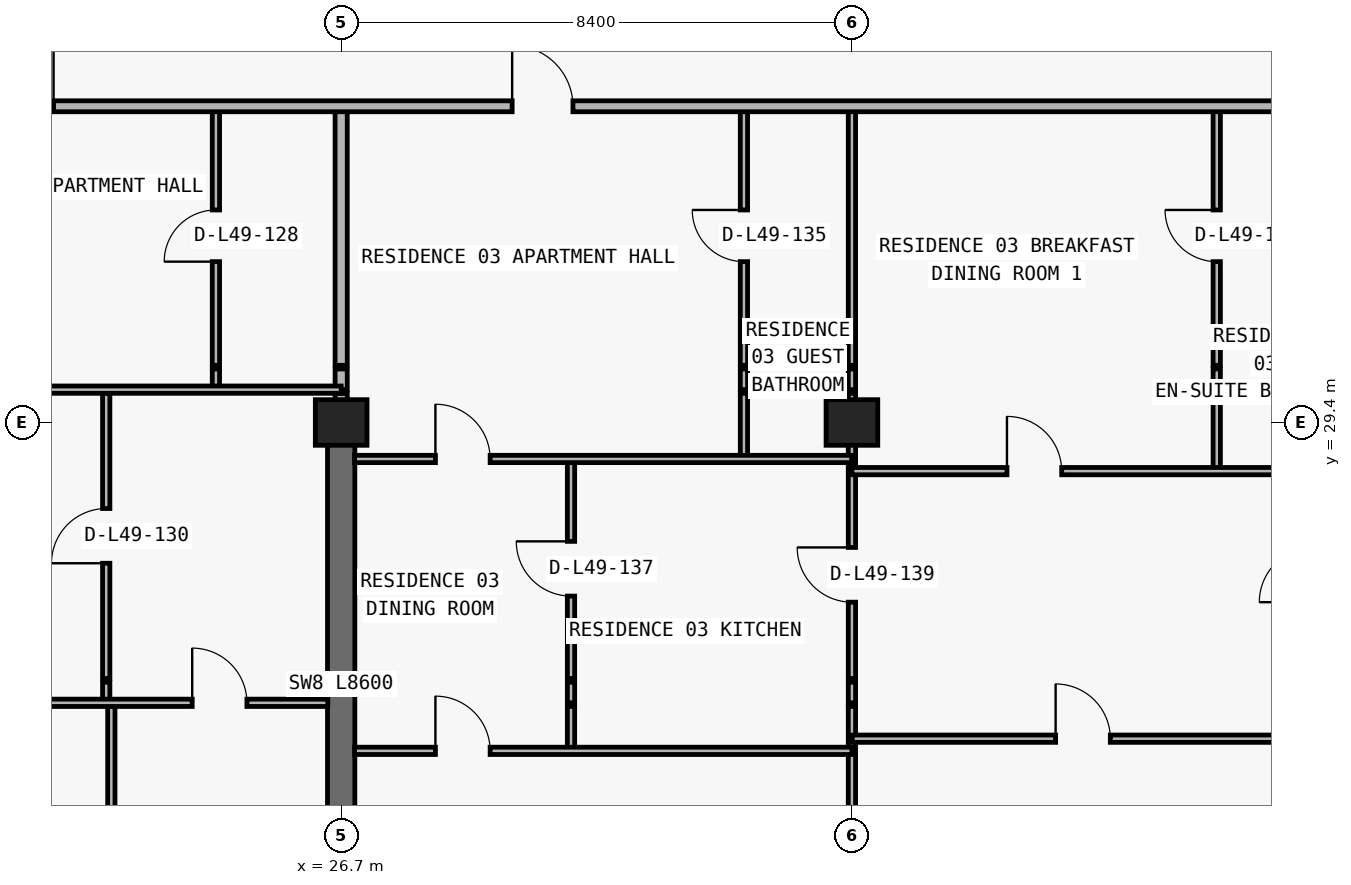
"""IFC4 building model, lengths in metres.
Left out: names, types, materials, properties, quantities, classifications, styles, units other than length and angle.
Written with IfcOpenShell. Run it as: python <this file> out.ifc"""

import sys

from ifc_helpers import new_model, si_unit, direction, frame, frame_2d, origin, origin_2d, place, context, subcontext, project, spatial, rectangle, extrude, element, fill, save


model = new_model("IFC4")
c1 = context("Model", 3, precision=1e-05, world=origin(), true_north=direction((0.0, 1.0)))
c2 = subcontext(c1, "Body", "Model", "MODEL_VIEW")
j1 = project(units=[si_unit("LENGTHUNIT", "METRE"), si_unit("PLANEANGLEUNIT", "RADIAN")], contexts=[c1])
p1 = place(None, origin())
s1 = spatial("IfcSite", under=j1, at=p1, CompositionType="ELEMENT")
p2 = place(p1, origin())
s2 = spatial("IfcBuilding", under=s1, at=p2, CompositionType="ELEMENT")
p3 = place(p2, frame((0.0, 0.0, 177.0)))
s3 = spatial("IfcBuildingStorey", under=s2, at=p3, CompositionType="ELEMENT", Elevation=177.0)
for number, where, z_axis, x_axis in (
    (1, (26.7, 29.4, 0.0), (0.0, 0.0, 1.0), (1.0, 0.0, 0.0)),
    (2, (35.1, 29.4, 0.0), (0.0, 0.0, 1.0), (1.0, 0.0, 0.0)),
):
    element("IfcColumn", number, at=place(p3, frame(where, z_axis=z_axis, x_axis=x_axis)), inside=s3, PredefinedType="COLUMN", context=c2, shape_type="SweptSolid", body=[
        extrude(rectangle(XDim=0.85, YDim=0.75, at=origin_2d()), origin(), (0.0, 0.0, 1.0), 3.05),
    ])
p4 = place(p3, frame((26.7, 20.8, 0.0), z_axis=(0.0, 0.0, 1.0), x_axis=(0.0, 1.0, 0.0)))
e3 = element("IfcWall", 3, at=p4, inside=s3, PredefinedType="SHEAR", context=c2, shape_type="SweptSolid", body=[
    extrude(rectangle(XDim=8.6, YDim=0.45, at=frame_2d((4.3, 0.0))), origin(), (0.0, 0.0, 1.0), 3.05),
])
p5 = place(p3, frame((22.836, 24.79, 0.0), z_axis=(0.0, 0.0, 1.0), x_axis=(0.0, 1.0, 0.0)))
e4 = element("IfcWall", 4, at=p5, inside=s3, PredefinedType="PARTITIONING", context=c2, shape_type="SweptSolid", body=[
    extrude(rectangle(XDim=0.34, YDim=0.12, at=frame_2d((0.17, 0.0))), origin(), (0.0, 0.0, 1.0), 3.05),
])
p6 = place(p3, frame((22.836, 25.19, 0.0), z_axis=(0.0, 0.0, 1.0), x_axis=(0.0, 1.0, 0.0)))
e5 = element("IfcWall", 5, at=p6, inside=s3, PredefinedType="PARTITIONING", context=c2, shape_type="SweptSolid", body=[
    extrude(rectangle(XDim=4.69, YDim=0.12, at=frame_2d((2.345, 0.0))), origin(), (0.0, 0.0, 1.0), 3.05),
])
p7 = place(p6, frame((1.895, 0.0, 0.0)))
e6 = element("IfcOpeningElement", 6, at=p7, cuts=e5, PredefinedType="OPENING", context=c2, shape_type="SweptSolid", body=[
    extrude(rectangle(XDim=0.9, YDim=2.15, at=frame_2d((0.45, 1.075))), frame((0.0, 0.07, 0.0), z_axis=(0.0, -1.0, 0.0), x_axis=(1.0, 0.0, 0.0)), (0.0, 0.0, 1.0), 0.14),
])
p8 = place(p3, frame((22.92, 11.24, 0.0), z_axis=(0.0, 0.0, 1.0), x_axis=(0.0, 1.0, 0.0)))
e7 = element("IfcWall", 7, at=p8, inside=s3, PredefinedType="PARTITIONING", context=c2, shape_type="SweptSolid", body=[
    extrude(rectangle(XDim=13.49, YDim=0.12, at=frame_2d((6.745, 0.0))), origin(), (0.0, 0.0, 1.0), 3.05),
])
p9 = place(p3, frame((24.64, 29.94, 0.0), z_axis=(0.0, 0.0, 1.0), x_axis=(0.0, 1.0, 0.0)))
e8 = element("IfcWall", 8, at=p9, inside=s3, PredefinedType="PARTITIONING", context=c2, shape_type="SweptSolid", body=[
    extrude(rectangle(XDim=0.34, YDim=0.12, at=frame_2d((0.17, 0.0))), origin(), (0.0, 0.0, 1.0), 3.05),
])
p10 = place(p3, frame((24.64, 30.34, 0.0), z_axis=(0.0, 0.0, 1.0), x_axis=(0.0, 1.0, 0.0)))
e9 = element("IfcWall", 9, at=p10, inside=s3, PredefinedType="PARTITIONING", context=c2, shape_type="SweptSolid", body=[
    extrude(rectangle(XDim=4.26, YDim=0.12, at=frame_2d((2.13, 0.0))), origin(), (0.0, 0.0, 1.0), 3.05),
])
p11 = place(p10, frame((1.705, 0.0, 0.0)))
e10 = element("IfcOpeningElement", 10, at=p11, cuts=e9, PredefinedType="OPENING", context=c2, shape_type="SweptSolid", body=[
    extrude(rectangle(XDim=0.85, YDim=2.1, at=frame_2d((0.425, 1.05))), frame((0.0, 0.07, 0.0), z_axis=(0.0, -1.0, 0.0), x_axis=(1.0, 0.0, 0.0)), (0.0, 0.0, 1.0), 0.14),
])
p12 = place(p3, frame((26.7, 29.405, 0.0), z_axis=(0.0, 0.0, 1.0), x_axis=(0.0, 1.0, 0.0)))
e11 = element("IfcWall", 11, at=p12, inside=s3, PredefinedType="PARTITIONING", context=c2, shape_type="SweptSolid", body=[
    extrude(rectangle(XDim=0.475, YDim=0.2, at=frame_2d((0.237, 0.0))), origin(), (0.0, 0.0, 1.0), 2.335),
])
p13 = place(p3, frame((26.7, 29.94, 0.0), z_axis=(0.0, 0.0, 1.0), x_axis=(0.0, 1.0, 0.0)))
e12 = element("IfcWall", 12, at=p13, inside=s3, PredefinedType="PARTITIONING", context=c2, shape_type="SweptSolid", body=[
    extrude(rectangle(XDim=0.34, YDim=0.2, at=frame_2d((0.17, 0.0))), origin(), (0.0, 0.0, 1.0), 2.335),
])
p14 = place(p3, frame((26.7, 30.34, 0.0), z_axis=(0.0, 0.0, 1.0), x_axis=(0.0, 1.0, 0.0)))
e13 = element("IfcWall", 13, at=p14, inside=s3, PredefinedType="PARTITIONING", context=c2, shape_type="SweptSolid", body=[
    extrude(rectangle(XDim=4.26, YDim=0.2, at=frame_2d((2.13, 0.0))), origin(), (0.0, 0.0, 1.0), 2.335),
])
p15 = place(p3, frame((30.48, 24.0, 0.0), z_axis=(0.0, 0.0, 1.0), x_axis=(0.0, 1.0, 0.0)))
e14 = element("IfcWall", 14, at=p15, inside=s3, PredefinedType="PARTITIONING", context=c2, shape_type="SweptSolid", body=[
    extrude(rectangle(XDim=0.73, YDim=0.12, at=frame_2d((0.365, 0.0))), origin(), (0.0, 0.0, 1.0), 3.05),
])
p16 = place(p3, frame((30.48, 24.79, 0.0), z_axis=(0.0, 0.0, 1.0), x_axis=(0.0, 1.0, 0.0)))
e15 = element("IfcWall", 15, at=p16, inside=s3, PredefinedType="PARTITIONING", context=c2, shape_type="SweptSolid", body=[
    extrude(rectangle(XDim=0.34, YDim=0.12, at=frame_2d((0.17, 0.0))), origin(), (0.0, 0.0, 1.0), 3.05),
])
p17 = place(p3, frame((30.48, 25.19, 0.0), z_axis=(0.0, 0.0, 1.0), x_axis=(0.0, 1.0, 0.0)))
e16 = element("IfcWall", 16, at=p17, inside=s3, PredefinedType="PARTITIONING", context=c2, shape_type="SweptSolid", body=[
    extrude(rectangle(XDim=3.61, YDim=0.12, at=frame_2d((1.805, 0.0))), origin(), (0.0, 0.0, 1.0), 3.05),
])
p18 = place(p17, frame((1.355, 0.0, 0.0)))
e17 = element("IfcOpeningElement", 17, at=p18, cuts=e16, PredefinedType="OPENING", context=c2, shape_type="SweptSolid", body=[
    extrude(rectangle(XDim=0.9, YDim=2.15, at=frame_2d((0.45, 1.075))), frame((0.0, 0.07, 0.0), z_axis=(0.0, -1.0, 0.0), x_axis=(1.0, 0.0, 0.0)), (0.0, 0.0, 1.0), 0.14),
])
p19 = place(p3, frame((33.324, 28.8, 0.0), z_axis=(0.0, 0.0, 1.0), x_axis=(0.0, 1.0, 0.0)))
e18 = element("IfcWall", 18, at=p19, inside=s3, PredefinedType="PARTITIONING", context=c2, shape_type="SweptSolid", body=[
    extrude(rectangle(XDim=1.08, YDim=0.12, at=frame_2d((0.54, 0.0))), origin(), (0.0, 0.0, 1.0), 3.05),
])
p20 = place(p3, frame((33.324, 29.94, 0.0), z_axis=(0.0, 0.0, 1.0), x_axis=(0.0, 1.0, 0.0)))
e19 = element("IfcWall", 19, at=p20, inside=s3, PredefinedType="PARTITIONING", context=c2, shape_type="SweptSolid", body=[
    extrude(rectangle(XDim=0.34, YDim=0.12, at=frame_2d((0.17, 0.0))), origin(), (0.0, 0.0, 1.0), 3.05),
])
p21 = place(p3, frame((33.324, 30.34, 0.0), z_axis=(0.0, 0.0, 1.0), x_axis=(0.0, 1.0, 0.0)))
e20 = element("IfcWall", 20, at=p21, inside=s3, PredefinedType="PARTITIONING", context=c2, shape_type="SweptSolid", body=[
    extrude(rectangle(XDim=4.26, YDim=0.12, at=frame_2d((2.13, 0.0))), origin(), (0.0, 0.0, 1.0), 3.05),
])
p22 = place(p21, frame((1.705, 0.0, 0.0)))
e21 = element("IfcOpeningElement", 21, at=p22, cuts=e20, PredefinedType="OPENING", context=c2, shape_type="SweptSolid", body=[
    extrude(rectangle(XDim=0.85, YDim=2.1, at=frame_2d((0.425, 1.05))), frame((0.0, 0.07, 0.0), z_axis=(0.0, -1.0, 0.0), x_axis=(1.0, 0.0, 0.0)), (0.0, 0.0, 1.0), 0.14),
])
p23 = place(p3, frame((35.1, 11.24, 0.0), z_axis=(0.0, 0.0, 1.0), x_axis=(0.0, 1.0, 0.0)))
e22 = element("IfcWall", 22, at=p23, inside=s3, PredefinedType="PARTITIONING", context=c2, shape_type="SweptSolid", body=[
    extrude(rectangle(XDim=13.49, YDim=0.12, at=frame_2d((6.745, 0.0))), origin(), (0.0, 0.0, 1.0), 2.263),
])
p24 = place(p3, frame((35.1, 24.79, 0.0), z_axis=(0.0, 0.0, 1.0), x_axis=(0.0, 1.0, 0.0)))
e23 = element("IfcWall", 23, at=p24, inside=s3, PredefinedType="PARTITIONING", context=c2, shape_type="SweptSolid", body=[
    extrude(rectangle(XDim=0.34, YDim=0.12, at=frame_2d((0.17, 0.0))), origin(), (0.0, 0.0, 1.0), 2.263),
])
p25 = place(p3, frame((35.1, 25.19, 0.0), z_axis=(0.0, 0.0, 1.0), x_axis=(0.0, 1.0, 0.0)))
e24 = element("IfcWall", 24, at=p25, inside=s3, PredefinedType="PARTITIONING", context=c2, shape_type="SweptSolid", body=[
    extrude(rectangle(XDim=4.69, YDim=0.12, at=frame_2d((2.345, 0.0))), origin(), (0.0, 0.0, 1.0), 2.263),
])
p26 = place(p25, frame((1.255, 0.0, 0.0)))
e25 = element("IfcOpeningElement", 25, at=p26, cuts=e24, PredefinedType="OPENING", context=c2, shape_type="SweptSolid", body=[
    extrude(rectangle(XDim=0.9, YDim=2.15, at=frame_2d((0.45, 1.075))), frame((0.0, 0.07, 0.0), z_axis=(0.0, -1.0, 0.0), x_axis=(1.0, 0.0, 0.0)), (0.0, 0.0, 1.0), 0.14),
])
p27 = place(p3, frame((35.1, 29.94, 0.0), z_axis=(0.0, 0.0, 1.0), x_axis=(0.0, 1.0, 0.0)))
e26 = element("IfcWall", 26, at=p27, inside=s3, PredefinedType="PARTITIONING", context=c2, shape_type="SweptSolid", body=[
    extrude(rectangle(XDim=0.34, YDim=0.12, at=frame_2d((0.17, 0.0))), origin(), (0.0, 0.0, 1.0), 2.263),
])
p28 = place(p3, frame((35.1, 30.34, 0.0), z_axis=(0.0, 0.0, 1.0), x_axis=(0.0, 1.0, 0.0)))
e27 = element("IfcWall", 27, at=p28, inside=s3, PredefinedType="PARTITIONING", context=c2, shape_type="SweptSolid", body=[
    extrude(rectangle(XDim=4.26, YDim=0.12, at=frame_2d((2.13, 0.0))), origin(), (0.0, 0.0, 1.0), 2.263),
])
p29 = place(p3, frame((41.1, 28.6, 0.0), z_axis=(0.0, 0.0, 1.0), x_axis=(0.0, 1.0, 0.0)))
e28 = element("IfcWall", 28, at=p29, inside=s3, PredefinedType="PARTITIONING", context=c2, shape_type="SweptSolid", body=[
    extrude(rectangle(XDim=1.28, YDim=0.12, at=frame_2d((0.64, 0.0))), origin(), (0.0, 0.0, 1.0), 3.05),
])
p30 = place(p3, frame((41.1, 29.94, 0.0), z_axis=(0.0, 0.0, 1.0), x_axis=(0.0, 1.0, 0.0)))
e29 = element("IfcWall", 29, at=p30, inside=s3, PredefinedType="PARTITIONING", context=c2, shape_type="SweptSolid", body=[
    extrude(rectangle(XDim=0.34, YDim=0.12, at=frame_2d((0.17, 0.0))), origin(), (0.0, 0.0, 1.0), 3.05),
])
p31 = place(p3, frame((41.1, 30.34, 0.0), z_axis=(0.0, 0.0, 1.0), x_axis=(0.0, 1.0, 0.0)))
e30 = element("IfcWall", 30, at=p31, inside=s3, PredefinedType="PARTITIONING", context=c2, shape_type="SweptSolid", body=[
    extrude(rectangle(XDim=4.26, YDim=0.12, at=frame_2d((2.13, 0.0))), origin(), (0.0, 0.0, 1.0), 3.05),
])
p32 = place(p31, frame((1.705, 0.0, 0.0)))
e31 = element("IfcOpeningElement", 31, at=p32, cuts=e30, PredefinedType="OPENING", context=c2, shape_type="SweptSolid", body=[
    extrude(rectangle(XDim=0.85, YDim=2.1, at=frame_2d((0.425, 1.05))), frame((0.0, 0.07, 0.0), z_axis=(0.0, -1.0, 0.0), x_axis=(1.0, 0.0, 0.0)), (0.0, 0.0, 1.0), 0.14),
])
p33 = place(p3, frame((26.92, 24.0, 0.0), z_axis=(0.0, 0.0, 1.0), x_axis=(1.0, 0.0, 0.0)))
e32 = element("IfcWall", 32, at=p33, inside=s3, PredefinedType="PARTITIONING", context=c2, shape_type="SweptSolid", body=[
    extrude(rectangle(XDim=8.18, YDim=0.12, at=frame_2d((4.09, 0.0))), origin(), (0.0, 0.0, 1.0), 3.05),
])
p34 = place(p33, frame((1.33, 0.0, 0.0)))
e33 = element("IfcOpeningElement", 33, at=p34, cuts=e32, PredefinedType="OPENING", context=c2, shape_type="SweptSolid", body=[
    extrude(rectangle(XDim=0.9, YDim=2.15, at=frame_2d((0.45, 1.075))), frame((0.0, 0.07, 0.0), z_axis=(0.0, -1.0, 0.0), x_axis=(1.0, 0.0, 0.0)), (0.0, 0.0, 1.0), 0.14),
])
p35 = place(p3, frame((35.105, 24.2, 0.0), z_axis=(0.0, 0.0, 1.0), x_axis=(1.0, 0.0, 0.0)))
e34 = element("IfcWall", 34, at=p35, inside=s3, PredefinedType="PARTITIONING", context=c2, shape_type="SweptSolid", body=[
    extrude(rectangle(XDim=7.59, YDim=0.12, at=frame_2d((3.795, 0.0))), origin(), (0.0, 0.0, 1.0), 3.05),
])
p36 = place(p35, frame((3.345, 0.0, 0.0)))
e35 = element("IfcOpeningElement", 35, at=p36, cuts=e34, PredefinedType="OPENING", context=c2, shape_type="SweptSolid", body=[
    extrude(rectangle(XDim=0.9, YDim=2.15, at=frame_2d((0.45, 1.075))), frame((0.0, 0.07, 0.0), z_axis=(0.0, -1.0, 0.0), x_axis=(1.0, 0.0, 0.0)), (0.0, 0.0, 1.0), 0.14),
])
p37 = place(p3, frame((18.3, 24.79, 0.0), z_axis=(0.0, 0.0, 1.0), x_axis=(1.0, 0.0, 0.0)))
e36 = element("IfcWall", 36, at=p37, inside=s3, PredefinedType="PARTITIONING", context=c2, shape_type="SweptSolid", body=[
    extrude(rectangle(XDim=8.18, YDim=0.12, at=frame_2d((4.09, 0.0))), origin(), (0.0, 0.0, 1.0), 3.05),
])
p38 = place(p37, frame((1.818, 0.0, 0.0)))
e37 = element("IfcOpeningElement", 37, at=p38, cuts=e36, PredefinedType="OPENING", context=c2, shape_type="SweptSolid", body=[
    extrude(rectangle(XDim=0.9, YDim=2.15, at=frame_2d((0.45, 1.075))), frame((0.0, 0.07, 0.0), z_axis=(0.0, -1.0, 0.0), x_axis=(1.0, 0.0, 0.0)), (0.0, 0.0, 1.0), 0.14),
])
p39 = place(p37, frame((5.95, 0.0, 0.0)))
e38 = element("IfcOpeningElement", 38, at=p39, cuts=e36, PredefinedType="OPENING", context=c2, shape_type="SweptSolid", body=[
    extrude(rectangle(XDim=0.9, YDim=2.15, at=frame_2d((0.45, 1.075))), frame((0.0, 0.07, 0.0), z_axis=(0.0, -1.0, 0.0), x_axis=(1.0, 0.0, 0.0)), (0.0, 0.0, 1.0), 0.14),
])
p40 = place(p3, frame((35.1, 28.6, 0.0), z_axis=(0.0, 0.0, 1.0), x_axis=(1.0, 0.0, 0.0)))
e39 = element("IfcWall", 39, at=p40, inside=s3, PredefinedType="PARTITIONING", context=c2, shape_type="SweptSolid", body=[
    extrude(rectangle(XDim=7.6, YDim=0.12, at=frame_2d((3.8, 0.0))), origin(), (0.0, 0.0, 1.0), 3.05),
])
p41 = place(p40, frame((2.55, 0.0, 0.0)))
e40 = element("IfcOpeningElement", 40, at=p41, cuts=e39, PredefinedType="OPENING", context=c2, shape_type="SweptSolid", body=[
    extrude(rectangle(XDim=0.9, YDim=2.15, at=frame_2d((0.45, 1.075))), frame((0.0, 0.07, 0.0), z_axis=(0.0, -1.0, 0.0), x_axis=(1.0, 0.0, 0.0)), (0.0, 0.0, 1.0), 0.14),
])
p42 = place(p3, frame((26.92, 28.8, 0.0), z_axis=(0.0, 0.0, 1.0), x_axis=(1.0, 0.0, 0.0)))
e41 = element("IfcWall", 41, at=p42, inside=s3, PredefinedType="PARTITIONING", context=c2, shape_type="SweptSolid", body=[
    extrude(rectangle(XDim=8.175, YDim=0.12, at=frame_2d((4.087, 0.0))), origin(), (0.0, 0.0, 1.0), 3.05),
])
p43 = place(p42, frame((1.33, 0.0, 0.0)))
e42 = element("IfcOpeningElement", 42, at=p43, cuts=e41, PredefinedType="OPENING", context=c2, shape_type="SweptSolid", body=[
    extrude(rectangle(XDim=0.9, YDim=2.15, at=frame_2d((0.45, 1.075))), frame((0.0, 0.07, 0.0), z_axis=(0.0, -1.0, 0.0), x_axis=(1.0, 0.0, 0.0)), (0.0, 0.0, 1.0), 0.14),
])
p44 = place(p3, frame((18.3, 29.94, 0.0), z_axis=(0.0, 0.0, 1.0), x_axis=(1.0, 0.0, 0.0)))
e43 = element("IfcWall", 43, at=p44, inside=s3, PredefinedType="PARTITIONING", context=c2, shape_type="SweptSolid", body=[
    extrude(rectangle(XDim=8.4, YDim=0.12, at=frame_2d((4.2, 0.0))), origin(), (0.0, 0.0, 1.0), 3.05),
])
p45 = place(p44, frame((1.818, 0.0, 0.0)))
e44 = element("IfcOpeningElement", 44, at=p45, cuts=e43, PredefinedType="OPENING", context=c2, shape_type="SweptSolid", body=[
    extrude(rectangle(XDim=0.9, YDim=2.15, at=frame_2d((0.45, 1.075))), frame((0.0, 0.07, 0.0), z_axis=(0.0, -1.0, 0.0), x_axis=(1.0, 0.0, 0.0)), (0.0, 0.0, 1.0), 0.14),
])
p46 = place(p3, frame((18.3, 34.6, 0.0), z_axis=(0.0, 0.0, 1.0), x_axis=(1.0, 0.0, 0.0)))
e45 = element("IfcWall", 45, at=p46, inside=s3, PredefinedType="PARTITIONING", context=c2, shape_type="SweptSolid", body=[
    extrude(rectangle(XDim=41.2, YDim=0.18, at=frame_2d((20.6, 0.0))), origin(), (0.0, 0.0, 1.0), 3.05),
])
p47 = place(p46, frame((2.67, 0.0, 0.0)))
e46 = element("IfcOpeningElement", 46, at=p47, cuts=e45, PredefinedType="OPENING", context=c2, shape_type="SweptSolid", body=[
    extrude(rectangle(XDim=1.0, YDim=2.2, at=frame_2d((0.5, 1.1))), frame((0.0, 0.1, 0.0), z_axis=(0.0, -1.0, 0.0), x_axis=(1.0, 0.0, 0.0)), (0.0, 0.0, 1.0), 0.2),
])
p48 = place(p46, frame((11.212, 0.0, 0.0)))
e47 = element("IfcOpeningElement", 47, at=p48, cuts=e45, PredefinedType="OPENING", context=c2, shape_type="SweptSolid", body=[
    extrude(rectangle(XDim=1.0, YDim=2.2, at=frame_2d((0.5, 1.1))), frame((0.0, 0.1, 0.0), z_axis=(0.0, -1.0, 0.0), x_axis=(1.0, 0.0, 0.0)), (0.0, 0.0, 1.0), 0.2),
])
p49 = place(p46, frame((35.483, 0.0, 0.0)))
e48 = element("IfcOpeningElement", 48, at=p49, cuts=e45, PredefinedType="OPENING", context=c2, shape_type="SweptSolid", body=[
    extrude(rectangle(XDim=1.0, YDim=2.2, at=frame_2d((0.5, 1.1))), frame((0.0, 0.1, 0.0), z_axis=(0.0, -1.0, 0.0), x_axis=(1.0, 0.0, 0.0)), (0.0, 0.0, 1.0), 0.2),
])
p50 = place(p47, origin())
e49 = element("IfcDoor", 49, at=p50, inside=s3, OperationType="SINGLE_SWING_RIGHT", PredefinedType="DOOR", context=c2, shape_type="SweptSolid", body=[
    extrude(rectangle(XDim=1.0, YDim=2.2, at=frame_2d((0.5, 1.1))), frame((0.0, 0.025, 0.0), z_axis=(0.0, -1.0, 0.0), x_axis=(1.0, 0.0, 0.0)), (0.0, 0.0, 1.0), 0.05),
])
fill(e46, e49)
p51 = place(p11, origin())
e50 = element("IfcDoor", 50, at=p51, inside=s3, OperationType="SINGLE_SWING_LEFT", PredefinedType="DOOR", context=c2, shape_type="SweptSolid", body=[
    extrude(rectangle(XDim=0.85, YDim=2.1, at=frame_2d((0.425, 1.05))), frame((0.0, 0.025, 0.0), z_axis=(0.0, -1.0, 0.0), x_axis=(1.0, 0.0, 0.0)), (0.0, 0.0, 1.0), 0.05),
])
fill(e10, e50)
p52 = place(p7, origin())
e51 = element("IfcDoor", 51, at=p52, inside=s3, OperationType="SINGLE_SWING_LEFT", PredefinedType="DOOR", context=c2, shape_type="SweptSolid", body=[
    extrude(rectangle(XDim=0.9, YDim=2.15, at=frame_2d((0.45, 1.075))), frame((0.0, 0.025, 0.0), z_axis=(0.0, -1.0, 0.0), x_axis=(1.0, 0.0, 0.0)), (0.0, 0.0, 1.0), 0.05),
])
fill(e6, e51)
p53 = place(p39, origin())
e52 = element("IfcDoor", 52, at=p53, inside=s3, OperationType="SINGLE_SWING_LEFT", PredefinedType="DOOR", context=c2, shape_type="SweptSolid", body=[
    extrude(rectangle(XDim=0.9, YDim=2.15, at=frame_2d((0.45, 1.075))), frame((0.0, 0.025, 0.0), z_axis=(0.0, -1.0, 0.0), x_axis=(1.0, 0.0, 0.0)), (0.0, 0.0, 1.0), 0.05),
])
fill(e38, e52)
p54 = place(p48, origin())
e53 = element("IfcDoor", 53, at=p54, inside=s3, OperationType="SINGLE_SWING_LEFT", PredefinedType="DOOR", context=c2, shape_type="SweptSolid", body=[
    extrude(rectangle(XDim=1.0, YDim=2.2, at=frame_2d((0.5, 1.1))), frame((0.0, 0.025, 0.0), z_axis=(0.0, -1.0, 0.0), x_axis=(1.0, 0.0, 0.0)), (0.0, 0.0, 1.0), 0.05),
])
fill(e47, e53)
p55 = place(p22, origin())
e54 = element("IfcDoor", 54, at=p55, inside=s3, OperationType="SINGLE_SWING_RIGHT", PredefinedType="DOOR", context=c2, shape_type="SweptSolid", body=[
    extrude(rectangle(XDim=0.85, YDim=2.1, at=frame_2d((0.425, 1.05))), frame((0.0, 0.025, 0.0), z_axis=(0.0, -1.0, 0.0), x_axis=(1.0, 0.0, 0.0)), (0.0, 0.0, 1.0), 0.05),
])
fill(e21, e54)
p56 = place(p43, origin())
e55 = element("IfcDoor", 55, at=p56, inside=s3, OperationType="SINGLE_SWING_LEFT", PredefinedType="DOOR", context=c2, shape_type="SweptSolid", body=[
    extrude(rectangle(XDim=0.9, YDim=2.15, at=frame_2d((0.45, 1.075))), frame((0.0, 0.025, 0.0), z_axis=(0.0, -1.0, 0.0), x_axis=(1.0, 0.0, 0.0)), (0.0, 0.0, 1.0), 0.05),
])
fill(e42, e55)
p57 = place(p18, origin())
e56 = element("IfcDoor", 56, at=p57, inside=s3, OperationType="SINGLE_SWING_RIGHT", PredefinedType="DOOR", context=c2, shape_type="SweptSolid", body=[
    extrude(rectangle(XDim=0.9, YDim=2.15, at=frame_2d((0.45, 1.075))), frame((0.0, 0.025, 0.0), z_axis=(0.0, -1.0, 0.0), x_axis=(1.0, 0.0, 0.0)), (0.0, 0.0, 1.0), 0.05),
])
fill(e17, e56)
p58 = place(p34, origin())
e57 = element("IfcDoor", 57, at=p58, inside=s3, OperationType="SINGLE_SWING_LEFT", PredefinedType="DOOR", context=c2, shape_type="SweptSolid", body=[
    extrude(rectangle(XDim=0.9, YDim=2.15, at=frame_2d((0.45, 1.075))), frame((0.0, 0.025, 0.0), z_axis=(0.0, -1.0, 0.0), x_axis=(1.0, 0.0, 0.0)), (0.0, 0.0, 1.0), 0.05),
])
fill(e33, e57)
p59 = place(p26, origin())
e58 = element("IfcDoor", 58, at=p59, inside=s3, OperationType="SINGLE_SWING_RIGHT", PredefinedType="DOOR", context=c2, shape_type="SweptSolid", body=[
    extrude(rectangle(XDim=0.9, YDim=2.15, at=frame_2d((0.45, 1.075))), frame((0.0, 0.025, 0.0), z_axis=(0.0, -1.0, 0.0), x_axis=(1.0, 0.0, 0.0)), (0.0, 0.0, 1.0), 0.05),
])
fill(e25, e58)
p60 = place(p41, origin())
e59 = element("IfcDoor", 59, at=p60, inside=s3, OperationType="SINGLE_SWING_LEFT", PredefinedType="DOOR", context=c2, shape_type="SweptSolid", body=[
    extrude(rectangle(XDim=0.9, YDim=2.15, at=frame_2d((0.45, 1.075))), frame((0.0, 0.025, 0.0), z_axis=(0.0, -1.0, 0.0), x_axis=(1.0, 0.0, 0.0)), (0.0, 0.0, 1.0), 0.05),
])
fill(e40, e59)
p61 = place(p32, origin())
e60 = element("IfcDoor", 60, at=p61, inside=s3, OperationType="SINGLE_SWING_RIGHT", PredefinedType="DOOR", context=c2, shape_type="SweptSolid", body=[
    extrude(rectangle(XDim=0.85, YDim=2.1, at=frame_2d((0.425, 1.05))), frame((0.0, 0.025, 0.0), z_axis=(0.0, -1.0, 0.0), x_axis=(1.0, 0.0, 0.0)), (0.0, 0.0, 1.0), 0.05),
])
fill(e31, e60)
p62 = place(p36, origin())
e61 = element("IfcDoor", 61, at=p62, inside=s3, OperationType="SINGLE_SWING_LEFT", PredefinedType="DOOR", context=c2, shape_type="SweptSolid", body=[
    extrude(rectangle(XDim=0.9, YDim=2.15, at=frame_2d((0.45, 1.075))), frame((0.0, 0.025, 0.0), z_axis=(0.0, -1.0, 0.0), x_axis=(1.0, 0.0, 0.0)), (0.0, 0.0, 1.0), 0.05),
])
fill(e35, e61)
save(model, sys.argv[1])
